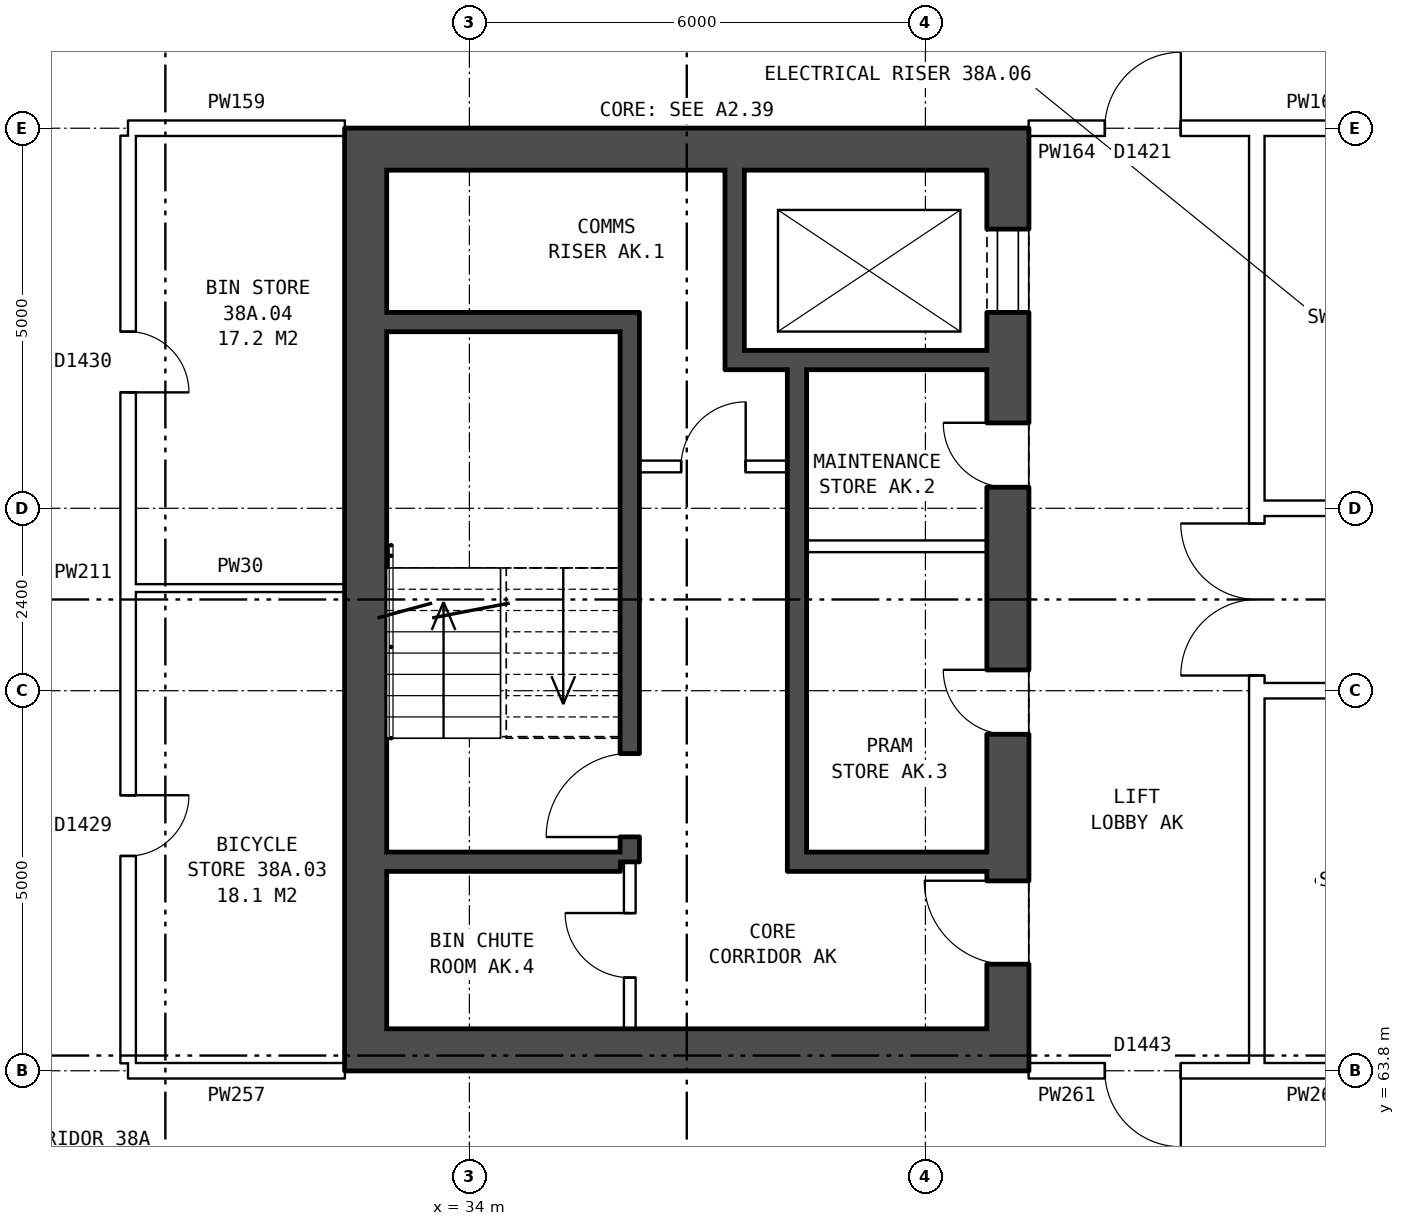
"""IFC4 building model, lengths in metres.
Left out: names, types, materials, properties, quantities, classifications, styles, units other than length and angle.
Written with IfcOpenShell. Run it as: python <this file> out.ifc"""

import sys

from ifc_helpers import new_model, si_unit, direction, frame, frame_2d, origin, place, context, subcontext, project, spatial, rectangle, extrude, element, fill, save


model = new_model("IFC4")
c1 = context("Model", 3, precision=1e-05, world=origin(), true_north=direction((0.0, 1.0)))
c2 = subcontext(c1, "Body", "Model", "MODEL_VIEW")
j1 = project(units=[si_unit("LENGTHUNIT", "METRE"), si_unit("PLANEANGLEUNIT", "RADIAN")], contexts=[c1])
p1 = place(None, origin())
s1 = spatial("IfcSite", under=j1, at=p1, CompositionType="ELEMENT")
p2 = place(p1, origin())
s2 = spatial("IfcBuilding", under=s1, at=p2, CompositionType="ELEMENT")
p3 = place(p2, frame((0.0, 0.0, 136.1)))
s3 = spatial("IfcBuildingStorey", under=s2, at=p3, CompositionType="ELEMENT", Elevation=136.1)
p4 = place(p3, frame((41.085, 76.2, 0.0), z_axis=(0.0, 0.0, 1.0), x_axis=(0.0, -1.0, 0.0)))
e1 = element("IfcWall", 1, at=p4, inside=s3, PredefinedType="SHEAR", context=c2, shape_type="SweptSolid", body=[
    extrude(rectangle(XDim=12.4, YDim=0.55, at=frame_2d((6.2, 0.0))), origin(), (0.0, 0.0, 1.0), 2.85),
])
p5 = place(p4, frame((1.325, 0.0, 0.0)))
e2 = element("IfcOpeningElement", 2, at=p5, cuts=e1, PredefinedType="OPENING", context=c2, shape_type="SweptSolid", body=[
    extrude(rectangle(XDim=1.1, YDim=2.1, at=frame_2d((0.55, 1.05))), frame((0.0, 0.285, 0.0), z_axis=(0.0, -1.0, 0.0), x_axis=(1.0, 0.0, 0.0)), (0.0, 0.0, 1.0), 0.57),
])
p6 = place(p4, frame((3.875, 0.0, 0.0)))
e3 = element("IfcOpeningElement", 3, at=p6, cuts=e1, PredefinedType="OPENING", context=c2, shape_type="SweptSolid", body=[
    extrude(rectangle(XDim=0.85, YDim=2.1, at=frame_2d((0.425, 1.05))), frame((0.0, 0.285, 0.0), z_axis=(0.0, -1.0, 0.0), x_axis=(1.0, 0.0, 0.0)), (0.0, 0.0, 1.0), 0.57),
])
p7 = place(p4, frame((7.125, 0.0, 0.0)))
e4 = element("IfcOpeningElement", 4, at=p7, cuts=e1, PredefinedType="OPENING", context=c2, shape_type="SweptSolid", body=[
    extrude(rectangle(XDim=0.85, YDim=2.1, at=frame_2d((0.425, 1.05))), frame((0.0, 0.285, 0.0), z_axis=(0.0, -1.0, 0.0), x_axis=(1.0, 0.0, 0.0)), (0.0, 0.0, 1.0), 0.57),
])
p8 = place(p4, frame((9.9, 0.0, 0.0)))
e5 = element("IfcOpeningElement", 5, at=p8, cuts=e1, PredefinedType="OPENING", context=c2, shape_type="SweptSolid", body=[
    extrude(rectangle(XDim=1.1, YDim=2.1, at=frame_2d((0.55, 1.05))), frame((0.0, 0.285, 0.0), z_axis=(0.0, -1.0, 0.0), x_axis=(1.0, 0.0, 0.0)), (0.0, 0.0, 1.0), 0.57),
])
p9 = place(p3, frame((32.635, 76.2, 0.0), z_axis=(0.0, 0.0, 1.0), x_axis=(0.0, -1.0, 0.0)))
e6 = element("IfcWall", 6, at=p9, inside=s3, PredefinedType="SHEAR", context=c2, shape_type="SweptSolid", body=[
    extrude(rectangle(XDim=12.4, YDim=0.55, at=frame_2d((6.2, 0.0))), origin(), (0.0, 0.0, 1.0), 2.85),
])
for number, where, z_axis, x_axis in (
    (7, (40.81, 75.925, 0.0), (0.0, 0.0, 1.0), (-1.0, 0.0, 0.0)),
    (8, (40.81, 64.075, 0.0), (0.0, 0.0, 1.0), (-1.0, 0.0, 0.0)),
):
    element("IfcWall", number, at=place(p3, frame(where, z_axis=z_axis, x_axis=x_axis)), inside=s3, PredefinedType="SHEAR", context=c2, shape_type="SweptSolid", body=[
        extrude(rectangle(XDim=7.9, YDim=0.55, at=frame_2d((3.95, 0.0))), origin(), (0.0, 0.0, 1.0), 2.85),
    ])
p10 = place(p3, frame((35.985, 73.65, 0.0), z_axis=(0.0, 0.0, 1.0), x_axis=(-1.0, 0.0, 0.0)))
e9 = element("IfcWall", 9, at=p10, inside=s3, PredefinedType="SHEAR", context=c2, shape_type="SweptSolid", body=[
    extrude(rectangle(XDim=3.075, YDim=0.25, at=frame_2d((1.538, 0.0))), origin(), (0.0, 0.0, 1.0), 2.85),
])
p11 = place(p3, frame((40.81, 73.15, 0.0), z_axis=(0.0, 0.0, 1.0), x_axis=(-1.0, 0.0, 0.0)))
e10 = element("IfcWall", 10, at=p11, inside=s3, PredefinedType="SHEAR", context=c2, shape_type="SweptSolid", body=[
    extrude(rectangle(XDim=3.445, YDim=0.25, at=frame_2d((1.723, 0.0))), origin(), (0.0, 0.0, 1.0), 2.85),
])
p12 = place(p3, frame((38.185, 71.75, 0.0), z_axis=(0.0, 0.0, 1.0), x_axis=(-1.0, 0.0, 0.0)))
e11 = element("IfcWall", 11, at=p12, inside=s3, PredefinedType="PARTITIONING", context=c2, shape_type="SweptSolid", body=[
    extrude(rectangle(XDim=1.95, YDim=0.15, at=frame_2d((0.975, 0.0))), origin(), (0.0, 0.0, 1.0), 2.85),
])
p13 = place(p12, frame((0.55, 0.0, 0.0)))
e12 = element("IfcOpeningElement", 12, at=p13, cuts=e11, PredefinedType="OPENING", context=c2, shape_type="SweptSolid", body=[
    extrude(rectangle(XDim=0.85, YDim=2.1, at=frame_2d((0.425, 1.05))), frame((0.0, 0.085, 0.0), z_axis=(0.0, -1.0, 0.0), x_axis=(1.0, 0.0, 0.0)), (0.0, 0.0, 1.0), 0.17),
])
p14 = place(p3, frame((40.81, 70.7, 0.0), z_axis=(0.0, 0.0, 1.0), x_axis=(-1.0, 0.0, 0.0)))
e13 = element("IfcWall", 13, at=p14, inside=s3, PredefinedType="PARTITIONING", context=c2, shape_type="SweptSolid", body=[
    extrude(rectangle(XDim=2.375, YDim=0.15, at=frame_2d((1.188, 0.0))), origin(), (0.0, 0.0, 1.0), 2.85),
])
p15 = place(p3, frame((40.81, 66.55, 0.0), z_axis=(0.0, 0.0, 1.0), x_axis=(-1.0, 0.0, 0.0)))
e14 = element("IfcWall", 14, at=p15, inside=s3, PredefinedType="SHEAR", context=c2, shape_type="SweptSolid", body=[
    extrude(rectangle(XDim=2.375, YDim=0.25, at=frame_2d((1.188, 0.0))), origin(), (0.0, 0.0, 1.0), 2.85),
])
p16 = place(p3, frame((35.985, 66.55, 0.0), z_axis=(0.0, 0.0, 1.0), x_axis=(-1.0, 0.0, 0.0)))
e15 = element("IfcWall", 15, at=p16, inside=s3, PredefinedType="SHEAR", context=c2, shape_type="SweptSolid", body=[
    extrude(rectangle(XDim=3.075, YDim=0.25, at=frame_2d((1.538, 0.0))), origin(), (0.0, 0.0, 1.0), 2.85),
])
p17 = place(p3, frame((38.31, 73.025, 0.0), z_axis=(0.0, 0.0, 1.0), x_axis=(0.0, -1.0, 0.0)))
e16 = element("IfcWall", 16, at=p17, inside=s3, PredefinedType="SHEAR", context=c2, shape_type="SweptSolid", body=[
    extrude(rectangle(XDim=6.6, YDim=0.25, at=frame_2d((3.3, 0.0))), origin(), (0.0, 0.0, 1.0), 2.85),
])
p18 = place(p3, frame((37.49, 75.65, 0.0), z_axis=(0.0, 0.0, 1.0), x_axis=(0.0, -1.0, 0.0)))
e17 = element("IfcWall", 17, at=p18, inside=s3, PredefinedType="SHEAR", context=c2, shape_type="SweptSolid", body=[
    extrude(rectangle(XDim=2.375, YDim=0.25, at=frame_2d((1.188, 0.0))), origin(), (0.0, 0.0, 1.0), 2.85),
])
p19 = place(p3, frame((36.11, 73.775, 0.0), z_axis=(0.0, 0.0, 1.0), x_axis=(0.0, -1.0, 0.0)))
e18 = element("IfcWall", 18, at=p19, inside=s3, PredefinedType="SHEAR", context=c2, shape_type="SweptSolid", body=[
    extrude(rectangle(XDim=7.225, YDim=0.25, at=frame_2d((3.612, 0.0))), origin(), (0.0, 0.0, 1.0), 2.85),
])
p20 = place(p19, frame((5.8, 0.0, 0.0)))
e19 = element("IfcOpeningElement", 19, at=p20, cuts=e18, PredefinedType="OPENING", context=c2, shape_type="SweptSolid", body=[
    extrude(rectangle(XDim=1.1, YDim=2.1, at=frame_2d((0.55, 1.05))), frame((0.0, 0.135, 0.0), z_axis=(0.0, -1.0, 0.0), x_axis=(1.0, 0.0, 0.0)), (0.0, 0.0, 1.0), 0.27),
])
p21 = place(p3, frame((36.11, 66.55, 0.0), z_axis=(0.0, 0.0, 1.0), x_axis=(0.0, -1.0, 0.0)))
e20 = element("IfcWall", 20, at=p21, inside=s3, PredefinedType="PARTITIONING", context=c2, shape_type="SweptSolid", body=[
    extrude(rectangle(XDim=2.2, YDim=0.15, at=frame_2d((1.1, 0.0))), origin(), (0.0, 0.0, 1.0), 2.85),
])
p22 = place(p21, frame((0.675, 0.0, 0.0)))
e21 = element("IfcOpeningElement", 21, at=p22, cuts=e20, PredefinedType="OPENING", context=c2, shape_type="SweptSolid", body=[
    extrude(rectangle(XDim=0.85, YDim=2.1, at=frame_2d((0.425, 1.05))), frame((0.0, 0.085, 0.0), z_axis=(0.0, -1.0, 0.0), x_axis=(1.0, 0.0, 0.0)), (0.0, 0.0, 1.0), 0.17),
])
p23 = place(p3, frame((44.36, 63.9, 0.0), z_axis=(0.0, 0.0, 1.0), x_axis=(0.0, 1.0, 0.0)))
e22 = element("IfcWall", 22, at=p23, inside=s3, PredefinedType="PARTITIONING", context=c2, shape_type="SweptSolid", body=[
    extrude(rectangle(XDim=12.2, YDim=0.2, at=frame_2d((6.1, 0.0))), origin(), (0.0, 0.0, 1.0), 2.85),
])
p24 = place(p23, frame((5.1, 0.0, 0.0)))
e23 = element("IfcOpeningElement", 23, at=p24, cuts=e22, PredefinedType="OPENING", context=c2, shape_type="SweptSolid", body=[
    extrude(rectangle(XDim=2.0, YDim=2.1, at=frame_2d((1.0, 1.05))), frame((0.0, 0.11, 0.0), z_axis=(0.0, -1.0, 0.0), x_axis=(1.0, 0.0, 0.0)), (0.0, 0.0, 1.0), 0.22),
])
p25 = place(p3, frame((29.51, 63.8, 0.0), z_axis=(0.0, 0.0, 1.0), x_axis=(1.0, 0.0, 0.0)))
e24 = element("IfcWall", 24, at=p25, inside=s3, PredefinedType="PARTITIONING", context=c2, shape_type="SweptSolid", body=[
    extrude(rectangle(XDim=2.85, YDim=0.2, at=frame_2d((1.425, 0.0))), origin(), (0.0, 0.0, 1.0), 2.85),
])
p26 = place(p3, frame((41.36, 63.8, 0.0), z_axis=(0.0, 0.0, 1.0), x_axis=(1.0, 0.0, 0.0)))
e25 = element("IfcWall", 25, at=p26, inside=s3, PredefinedType="PARTITIONING", context=c2, shape_type="SweptSolid", body=[
    extrude(rectangle(XDim=3.0, YDim=0.2, at=frame_2d((1.5, 0.0))), origin(), (0.0, 0.0, 1.0), 2.85),
])
p27 = place(p26, frame((1.0, 0.0, 0.0)))
e26 = element("IfcOpeningElement", 26, at=p27, cuts=e25, PredefinedType="OPENING", context=c2, shape_type="SweptSolid", body=[
    extrude(rectangle(XDim=1.0, YDim=2.1, at=frame_2d((0.5, 1.05))), frame((0.0, 0.11, 0.0), z_axis=(0.0, -1.0, 0.0), x_axis=(1.0, 0.0, 0.0)), (0.0, 0.0, 1.0), 0.22),
])
p28 = place(p3, frame((44.36, 63.8, 0.0), z_axis=(0.0, 0.0, 1.0), x_axis=(1.0, 0.0, 0.0)))
e27 = element("IfcWall", 27, at=p28, inside=s3, PredefinedType="PARTITIONING", context=c2, shape_type="SweptSolid", body=[
    extrude(rectangle(XDim=1.54, YDim=0.2, at=frame_2d((0.77, 0.0))), origin(), (0.0, 0.0, 1.0), 2.85),
])
p29 = place(p3, frame((44.36, 68.8, 0.0), z_axis=(0.0, 0.0, 1.0), x_axis=(1.0, 0.0, 0.0)))
e28 = element("IfcWall", 28, at=p29, inside=s3, PredefinedType="PARTITIONING", context=c2, shape_type="SweptSolid", body=[
    extrude(rectangle(XDim=19.28, YDim=0.2, at=frame_2d((9.64, 0.0))), origin(), (0.0, 0.0, 1.0), 2.85),
])
p30 = place(p29, frame((14.64, 0.0, 0.0)))
e29 = element("IfcOpeningElement", 29, at=p30, cuts=e28, PredefinedType="OPENING", context=c2, shape_type="SweptSolid", body=[
    extrude(rectangle(XDim=1.0, YDim=2.1, at=frame_2d((0.5, 1.05))), frame((0.0, 0.11, 0.0), z_axis=(0.0, -1.0, 0.0), x_axis=(1.0, 0.0, 0.0)), (0.0, 0.0, 1.0), 0.22),
])
p31 = place(p29, frame((8.64, 0.0, 0.0)))
e30 = element("IfcOpeningElement", 30, at=p31, cuts=e28, PredefinedType="OPENING", context=c2, shape_type="SweptSolid", body=[
    extrude(rectangle(XDim=1.0, YDim=2.1, at=frame_2d((0.5, 1.05))), frame((0.0, 0.11, 0.0), z_axis=(0.0, -1.0, 0.0), x_axis=(1.0, 0.0, 0.0)), (0.0, 0.0, 1.0), 0.22),
])
p32 = place(p29, frame((2.64, 0.0, 0.0)))
e31 = element("IfcOpeningElement", 31, at=p32, cuts=e28, PredefinedType="OPENING", context=c2, shape_type="SweptSolid", body=[
    extrude(rectangle(XDim=1.0, YDim=2.1, at=frame_2d((0.5, 1.05))), frame((0.0, 0.11, 0.0), z_axis=(0.0, -1.0, 0.0), x_axis=(1.0, 0.0, 0.0)), (0.0, 0.0, 1.0), 0.22),
])
p33 = place(p3, frame((29.61, 70.15, 0.0), z_axis=(0.0, 0.0, 1.0), x_axis=(1.0, 0.0, 0.0)))
e32 = element("IfcWall", 32, at=p33, inside=s3, PredefinedType="PARTITIONING", context=c2, shape_type="SweptSolid", body=[
    extrude(rectangle(XDim=2.75, YDim=0.1, at=frame_2d((1.375, 0.0))), origin(), (0.0, 0.0, 1.0), 2.85),
])
p34 = place(p3, frame((44.36, 71.2, 0.0), z_axis=(0.0, 0.0, 1.0), x_axis=(1.0, 0.0, 0.0)))
e33 = element("IfcWall", 33, at=p34, inside=s3, PredefinedType="PARTITIONING", context=c2, shape_type="SweptSolid", body=[
    extrude(rectangle(XDim=19.28, YDim=0.2, at=frame_2d((9.64, 0.0))), origin(), (0.0, 0.0, 1.0), 2.85),
])
p35 = place(p34, frame((17.46, 0.0, 0.0)))
e34 = element("IfcOpeningElement", 34, at=p35, cuts=e33, PredefinedType="OPENING", context=c2, shape_type="SweptSolid", body=[
    extrude(rectangle(XDim=1.0, YDim=2.1, at=frame_2d((0.5, 1.05))), frame((0.0, 0.11, 0.0), z_axis=(0.0, -1.0, 0.0), x_axis=(1.0, 0.0, 0.0)), (0.0, 0.0, 1.0), 0.22),
])
p36 = place(p34, frame((8.64, 0.0, 0.0)))
e35 = element("IfcOpeningElement", 35, at=p36, cuts=e33, PredefinedType="OPENING", context=c2, shape_type="SweptSolid", body=[
    extrude(rectangle(XDim=1.0, YDim=2.1, at=frame_2d((0.5, 1.05))), frame((0.0, 0.11, 0.0), z_axis=(0.0, -1.0, 0.0), x_axis=(1.0, 0.0, 0.0)), (0.0, 0.0, 1.0), 0.22),
])
p37 = place(p34, frame((2.64, 0.0, 0.0)))
e36 = element("IfcOpeningElement", 36, at=p37, cuts=e33, PredefinedType="OPENING", context=c2, shape_type="SweptSolid", body=[
    extrude(rectangle(XDim=1.0, YDim=2.1, at=frame_2d((0.5, 1.05))), frame((0.0, 0.11, 0.0), z_axis=(0.0, -1.0, 0.0), x_axis=(1.0, 0.0, 0.0)), (0.0, 0.0, 1.0), 0.22),
])
p38 = place(p3, frame((29.51, 76.2, 0.0), z_axis=(0.0, 0.0, 1.0), x_axis=(1.0, 0.0, 0.0)))
e37 = element("IfcWall", 37, at=p38, inside=s3, PredefinedType="PARTITIONING", context=c2, shape_type="SweptSolid", body=[
    extrude(rectangle(XDim=2.85, YDim=0.2, at=frame_2d((1.425, 0.0))), origin(), (0.0, 0.0, 1.0), 2.85),
])
p39 = place(p3, frame((41.36, 76.2, 0.0), z_axis=(0.0, 0.0, 1.0), x_axis=(1.0, 0.0, 0.0)))
e38 = element("IfcWall", 38, at=p39, inside=s3, PredefinedType="PARTITIONING", context=c2, shape_type="SweptSolid", body=[
    extrude(rectangle(XDim=3.0, YDim=0.2, at=frame_2d((1.5, 0.0))), origin(), (0.0, 0.0, 1.0), 2.85),
])
p40 = place(p39, frame((1.0, 0.0, 0.0)))
e39 = element("IfcOpeningElement", 39, at=p40, cuts=e38, PredefinedType="OPENING", context=c2, shape_type="SweptSolid", body=[
    extrude(rectangle(XDim=1.0, YDim=2.1, at=frame_2d((0.5, 1.05))), frame((0.0, 0.11, 0.0), z_axis=(0.0, -1.0, 0.0), x_axis=(1.0, 0.0, 0.0)), (0.0, 0.0, 1.0), 0.22),
])
p41 = place(p3, frame((44.36, 76.2, 0.0), z_axis=(0.0, 0.0, 1.0), x_axis=(1.0, 0.0, 0.0)))
e40 = element("IfcWall", 40, at=p41, inside=s3, PredefinedType="PARTITIONING", context=c2, shape_type="SweptSolid", body=[
    extrude(rectangle(XDim=1.54, YDim=0.2, at=frame_2d((0.77, 0.0))), origin(), (0.0, 0.0, 1.0), 2.85),
])
p42 = place(p3, frame((29.51, 63.9, 0.0), z_axis=(0.0, 0.0, 1.0), x_axis=(0.0, 1.0, 0.0)))
e41 = element("IfcWall", 41, at=p42, inside=s3, PredefinedType="PARTITIONING", context=c2, shape_type="SweptSolid", body=[
    extrude(rectangle(XDim=12.2, YDim=0.2, at=frame_2d((6.1, 0.0))), origin(), (0.0, 0.0, 1.0), 2.85),
])
p43 = place(p42, frame((2.725, 0.0, 0.0)))
e42 = element("IfcOpeningElement", 42, at=p43, cuts=e41, PredefinedType="OPENING", context=c2, shape_type="SweptSolid", body=[
    extrude(rectangle(XDim=0.8, YDim=2.1, at=frame_2d((0.4, 1.05))), frame((0.0, 0.11, 0.0), z_axis=(0.0, -1.0, 0.0), x_axis=(1.0, 0.0, 0.0)), (0.0, 0.0, 1.0), 0.22),
])
p44 = place(p42, frame((8.825, 0.0, 0.0)))
e43 = element("IfcOpeningElement", 43, at=p44, cuts=e41, PredefinedType="OPENING", context=c2, shape_type="SweptSolid", body=[
    extrude(rectangle(XDim=0.8, YDim=2.1, at=frame_2d((0.4, 1.05))), frame((0.0, 0.11, 0.0), z_axis=(0.0, -1.0, 0.0), x_axis=(1.0, 0.0, 0.0)), (0.0, 0.0, 1.0), 0.22),
])
p45 = place(p5, origin())
e44 = element("IfcDoor", 44, at=p45, inside=s3, OperationType="DOUBLE_DOOR_SLIDING", PredefinedType="DOOR", context=c2, shape_type="SweptSolid", body=[
    extrude(rectangle(XDim=1.1, YDim=2.1, at=frame_2d((0.55, 1.05))), frame((0.0, -0.21, 0.0), z_axis=(0.0, -1.0, 0.0), x_axis=(1.0, 0.0, 0.0)), (0.0, 0.0, 1.0), 0.05),
])
fill(e2, e44)
p46 = place(p6, frame((0.85, 0.0, 0.0), z_axis=(0.0, 0.0, 1.0), x_axis=(-1.0, 0.0, 0.0)))
e45 = element("IfcDoor", 45, at=p46, inside=s3, OperationType="SINGLE_SWING_RIGHT", PredefinedType="DOOR", context=c2, shape_type="SweptSolid", body=[
    extrude(rectangle(XDim=0.85, YDim=2.1, at=frame_2d((0.425, 1.05))), frame((0.0, 0.26, 0.0), z_axis=(0.0, -1.0, 0.0), x_axis=(1.0, 0.0, 0.0)), (0.0, 0.0, 1.0), 0.05),
])
fill(e3, e45)
p47 = place(p7, frame((0.85, 0.0, 0.0), z_axis=(0.0, 0.0, 1.0), x_axis=(-1.0, 0.0, 0.0)))
e46 = element("IfcDoor", 46, at=p47, inside=s3, OperationType="SINGLE_SWING_RIGHT", PredefinedType="DOOR", context=c2, shape_type="SweptSolid", body=[
    extrude(rectangle(XDim=0.85, YDim=2.1, at=frame_2d((0.425, 1.05))), frame((0.0, 0.26, 0.0), z_axis=(0.0, -1.0, 0.0), x_axis=(1.0, 0.0, 0.0)), (0.0, 0.0, 1.0), 0.05),
])
fill(e4, e46)
p48 = place(p8, frame((1.1, 0.0, 0.0), z_axis=(0.0, 0.0, 1.0), x_axis=(-1.0, 0.0, 0.0)))
e47 = element("IfcDoor", 47, at=p48, inside=s3, OperationType="SINGLE_SWING_RIGHT", PredefinedType="DOOR", context=c2, shape_type="SweptSolid", body=[
    extrude(rectangle(XDim=1.1, YDim=2.1, at=frame_2d((0.55, 1.05))), frame((0.0, 0.26, 0.0), z_axis=(0.0, -1.0, 0.0), x_axis=(1.0, 0.0, 0.0)), (0.0, 0.0, 1.0), 0.05),
])
fill(e5, e47)
p49 = place(p20, frame((1.1, 0.0, 0.0), z_axis=(0.0, 0.0, 1.0), x_axis=(-1.0, 0.0, 0.0)))
e48 = element("IfcDoor", 48, at=p49, inside=s3, OperationType="SINGLE_SWING_LEFT", PredefinedType="DOOR", context=c2, shape_type="SweptSolid", body=[
    extrude(rectangle(XDim=1.1, YDim=2.1, at=frame_2d((0.55, 1.05))), frame((0.0, 0.025, 0.0), z_axis=(0.0, -1.0, 0.0), x_axis=(1.0, 0.0, 0.0)), (0.0, 0.0, 1.0), 0.05),
])
fill(e19, e48)
p50 = place(p13, frame((0.85, 0.0, 0.0), z_axis=(0.0, 0.0, 1.0), x_axis=(-1.0, 0.0, 0.0)))
e49 = element("IfcDoor", 49, at=p50, inside=s3, OperationType="SINGLE_SWING_RIGHT", PredefinedType="DOOR", context=c2, shape_type="SweptSolid", body=[
    extrude(rectangle(XDim=0.85, YDim=2.1, at=frame_2d((0.425, 1.05))), frame((0.0, 0.025, 0.0), z_axis=(0.0, -1.0, 0.0), x_axis=(1.0, 0.0, 0.0)), (0.0, 0.0, 1.0), 0.05),
])
fill(e12, e49)
p51 = place(p22, frame((0.85, 0.0, 0.0), z_axis=(0.0, 0.0, 1.0), x_axis=(-1.0, 0.0, 0.0)))
e50 = element("IfcDoor", 50, at=p51, inside=s3, OperationType="SINGLE_SWING_RIGHT", PredefinedType="DOOR", context=c2, shape_type="SweptSolid", body=[
    extrude(rectangle(XDim=0.85, YDim=2.1, at=frame_2d((0.425, 1.05))), frame((0.0, 0.025, 0.0), z_axis=(0.0, -1.0, 0.0), x_axis=(1.0, 0.0, 0.0)), (0.0, 0.0, 1.0), 0.05),
])
fill(e21, e50)
p52 = place(p24, origin())
e51 = element("IfcDoor", 51, at=p52, inside=s3, OperationType="DOUBLE_DOOR_SINGLE_SWING", PredefinedType="DOOR", context=c2, shape_type="SweptSolid", body=[
    extrude(rectangle(XDim=2.0, YDim=2.1, at=frame_2d((1.0, 1.05))), frame((0.0, 0.025, 0.0), z_axis=(0.0, -1.0, 0.0), x_axis=(1.0, 0.0, 0.0)), (0.0, 0.0, 1.0), 0.05),
])
fill(e23, e51)
p53 = place(p27, frame((1.0, 0.0, 0.0), z_axis=(0.0, 0.0, 1.0), x_axis=(-1.0, 0.0, 0.0)))
e52 = element("IfcDoor", 52, at=p53, inside=s3, OperationType="SINGLE_SWING_LEFT", PredefinedType="DOOR", context=c2, shape_type="SweptSolid", body=[
    extrude(rectangle(XDim=1.0, YDim=2.1, at=frame_2d((0.5, 1.05))), frame((0.0, 0.025, 0.0), z_axis=(0.0, -1.0, 0.0), x_axis=(1.0, 0.0, 0.0)), (0.0, 0.0, 1.0), 0.05),
])
fill(e26, e52)
p54 = place(p40, origin())
e53 = element("IfcDoor", 53, at=p54, inside=s3, OperationType="SINGLE_SWING_RIGHT", PredefinedType="DOOR", context=c2, shape_type="SweptSolid", body=[
    extrude(rectangle(XDim=1.0, YDim=2.1, at=frame_2d((0.5, 1.05))), frame((0.0, 0.025, 0.0), z_axis=(0.0, -1.0, 0.0), x_axis=(1.0, 0.0, 0.0)), (0.0, 0.0, 1.0), 0.05),
])
fill(e39, e53)
p55 = place(p43, frame((0.8, 0.0, 0.0), z_axis=(0.0, 0.0, 1.0), x_axis=(-1.0, 0.0, 0.0)))
e54 = element("IfcDoor", 54, at=p55, inside=s3, OperationType="SINGLE_SWING_LEFT", PredefinedType="DOOR", context=c2, shape_type="SweptSolid", body=[
    extrude(rectangle(XDim=0.8, YDim=2.1, at=frame_2d((0.4, 1.05))), frame((0.0, 0.025, 0.0), z_axis=(0.0, -1.0, 0.0), x_axis=(1.0, 0.0, 0.0)), (0.0, 0.0, 1.0), 0.05),
])
fill(e42, e54)
p56 = place(p44, frame((0.8, 0.0, 0.0), z_axis=(0.0, 0.0, 1.0), x_axis=(-1.0, 0.0, 0.0)))
e55 = element("IfcDoor", 55, at=p56, inside=s3, OperationType="SINGLE_SWING_RIGHT", PredefinedType="DOOR", context=c2, shape_type="SweptSolid", body=[
    extrude(rectangle(XDim=0.8, YDim=2.1, at=frame_2d((0.4, 1.05))), frame((0.0, 0.025, 0.0), z_axis=(0.0, -1.0, 0.0), x_axis=(1.0, 0.0, 0.0)), (0.0, 0.0, 1.0), 0.05),
])
fill(e43, e55)
save(model, sys.argv[1])
